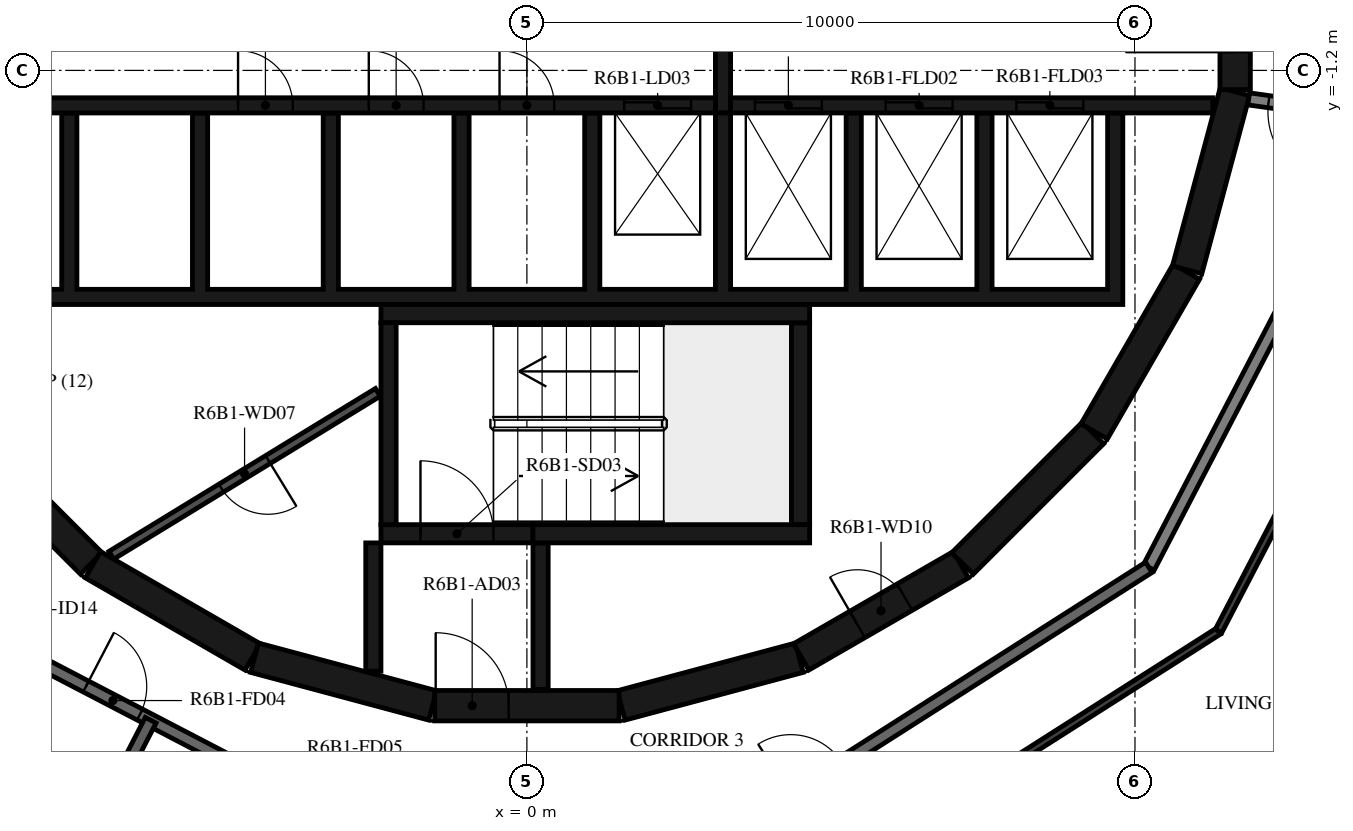
"""IFC4 building model, lengths in metres.
Left out: names, types, materials, properties, quantities, classifications, styles, units other than length and angle.
Written with IfcOpenShell. Run it as: python <this file> out.ifc"""

import sys

from ifc_helpers import new_model, si_unit, direction, frame, frame_2d, origin, place, context, subcontext, project, spatial, polyline, rectangle, outline, extrude, element, fill, save


model = new_model("IFC4")
c1 = context("Model", 3, precision=1e-05, world=origin(), true_north=direction((0.0, 1.0)))
c2 = subcontext(c1, "Body", "Model", "MODEL_VIEW")
j1 = project(units=[si_unit("LENGTHUNIT", "METRE"), si_unit("PLANEANGLEUNIT", "RADIAN")], contexts=[c1])
p1 = place(None, origin())
s1 = spatial("IfcSite", under=j1, at=p1, CompositionType="ELEMENT")
p2 = place(p1, origin())
s2 = spatial("IfcBuilding", under=s1, at=p2, CompositionType="ELEMENT")
p3 = place(p2, frame((0.0, 0.0, 237.2)))
s3 = spatial("IfcBuildingStorey", under=s2, at=p3, CompositionType="ELEMENT", Elevation=237.2)
p4 = place(p3, frame((1.55, -11.643, 0.0), z_axis=(0.0, 0.0, 1.0), x_axis=(0.965948410781, 0.258734743916, 0.0)))
e1 = element("IfcWall", 1, at=p4, inside=s3, PredefinedType="SHEAR", context=c2, shape_type="SweptSolid", body=[
    extrude(rectangle(XDim=3.033, YDim=0.5, at=frame_2d((1.516, 0.0))), origin(), (0.0, 0.0, 1.0), 3.12),
])
p5 = place(p3, frame((4.51, -10.845, 0.0), z_axis=(0.0, 0.0, 1.0), x_axis=(0.865975092491, 0.500087131594, 0.0)))
e2 = element("IfcWall", 2, at=p5, inside=s3, PredefinedType="SHEAR", context=c2, shape_type="SweptSolid", body=[
    extrude(rectangle(XDim=3.033, YDim=0.5, at=frame_2d((1.516, 0.0))), origin(), (0.0, 0.0, 1.0), 3.12),
])
p6 = place(p5, frame((1.066, 0.0, 0.0)))
e3 = element("IfcOpeningElement", 3, at=p6, cuts=e2, PredefinedType="OPENING", context=c2, shape_type="SweptSolid", body=[
    extrude(rectangle(XDim=0.9, YDim=2.1, at=frame_2d((0.45, 1.05))), frame((0.0, 0.26, 0.0), z_axis=(0.0, -1.0, 0.0), x_axis=(1.0, 0.0, 0.0)), (0.0, 0.0, 1.0), 0.52),
])
p7 = place(p3, frame((7.164, -9.308, 0.0), z_axis=(0.0, 0.0, 1.0), x_axis=(0.707106781187, 0.707106781187, 0.0)))
e4 = element("IfcWall", 4, at=p7, inside=s3, PredefinedType="SHEAR", context=c2, shape_type="SweptSolid", body=[
    extrude(rectangle(XDim=3.032, YDim=0.5, at=frame_2d((1.516, 0.0))), origin(), (0.0, 0.0, 1.0), 3.12),
])
for number, where, z_axis, x_axis in (
    (5, (9.329, -7.137, 0.0), (0.0, 0.0, 1.0), (0.5, 0.866, 0.0)),
    (6, (10.858, -4.479, 0.0), (0.0, 0.0, 1.0), (0.259, 0.966, 0.0)),
):
    element("IfcWall", number, at=place(p3, frame(where, z_axis=z_axis, x_axis=x_axis)), inside=s3, PredefinedType="SHEAR", context=c2, shape_type="SweptSolid", body=[
        extrude(rectangle(XDim=3.033, YDim=0.5, at=frame_2d((1.516, 0.0))), origin(), (0.0, 0.0, 1.0), 3.12),
    ])
p8 = place(p3, frame((11.647, -1.516, 0.0), z_axis=(0.0, 0.0, 1.0), x_axis=(0.0, 1.0, 0.0)))
e7 = element("IfcWall", 7, at=p8, inside=s3, PredefinedType="SHEAR", context=c2, shape_type="SweptSolid", body=[
    extrude(rectangle(XDim=3.033, YDim=0.5, at=frame_2d((1.516, 0.0))), origin(), (0.0, 0.0, 1.0), 3.12),
])
p9 = place(p8, frame((0.616, 0.0, 0.0)))
e8 = element("IfcOpeningElement", 8, at=p9, cuts=e7, PredefinedType="OPENING", context=c2, shape_type="SweptSolid", body=[
    extrude(rectangle(XDim=1.8, YDim=2.1, at=frame_2d((0.9, 1.05))), frame((0.0, 0.26, 0.0), z_axis=(0.0, -1.0, 0.0), x_axis=(1.0, 0.0, 0.0)), (0.0, 0.0, 1.0), 0.52),
])
p10 = place(p3, frame((-9.308, -7.164, 0.0), z_axis=(0.0, 0.0, 1.0), x_axis=(0.707106781187, -0.707106781187, 0.0)))
e9 = element("IfcWall", 9, at=p10, inside=s3, PredefinedType="SHEAR", context=c2, shape_type="SweptSolid", body=[
    extrude(rectangle(XDim=3.032, YDim=0.5, at=frame_2d((1.516, 0.0))), origin(), (0.0, 0.0, 1.0), 3.12),
])
for number, where, z_axis, x_axis in (
    (10, (-7.137, -9.329, 0.0), (0.0, 0.0, 1.0), (0.866, -0.5, 0.0)),
    (11, (-4.479, -10.858, 0.0), (0.0, 0.0, 1.0), (0.966, -0.259, 0.0)),
):
    element("IfcWall", number, at=place(p3, frame(where, z_axis=z_axis, x_axis=x_axis)), inside=s3, PredefinedType="SHEAR", context=c2, shape_type="SweptSolid", body=[
        extrude(rectangle(XDim=3.033, YDim=0.5, at=frame_2d((1.516, 0.0))), origin(), (0.0, 0.0, 1.0), 3.12),
    ])
p11 = place(p3, frame((-1.516, -11.647, 0.0), z_axis=(0.0, 0.0, 1.0), x_axis=(1.0, 0.0, 0.0)))
e12 = element("IfcWall", 12, at=p11, inside=s3, PredefinedType="SHEAR", context=c2, shape_type="SweptSolid", body=[
    extrude(rectangle(XDim=3.033, YDim=0.5, at=frame_2d((1.516, 0.0))), origin(), (0.0, 0.0, 1.0), 3.12),
])
p12 = place(p11, frame((0.016, 0.0, 0.0)))
e13 = element("IfcOpeningElement", 13, at=p12, cuts=e12, PredefinedType="OPENING", context=c2, shape_type="SweptSolid", body=[
    extrude(rectangle(XDim=1.2, YDim=2.1, at=frame_2d((0.6, 1.05))), frame((0.0, 0.26, 0.0), z_axis=(0.0, -1.0, 0.0), x_axis=(1.0, 0.0, 0.0)), (0.0, 0.0, 1.0), 0.52),
])
p13 = place(p3, frame((-2.275, -8.67, 0.0), z_axis=(0.0, 0.0, 1.0), x_axis=(0.0, 1.0, 0.0)))
e14 = element("IfcWall", 14, at=p13, inside=s3, PredefinedType="SHEAR", context=c2, shape_type="SweptSolid", body=[
    extrude(rectangle(XDim=3.32, YDim=0.25, at=frame_2d((1.66, 0.0))), origin(), (0.0, 0.0, 1.0), 3.12),
])
p14 = place(p3, frame((-2.4, -5.2, 0.0), z_axis=(0.0, 0.0, 1.0), x_axis=(1.0, 0.0, 0.0)))
e15 = element("IfcWall", 15, at=p14, inside=s3, PredefinedType="SHEAR", context=c2, shape_type="SweptSolid", body=[
    extrude(rectangle(XDim=7.05, YDim=0.3, at=frame_2d((3.525, 0.0))), origin(), (0.0, 0.0, 1.0), 3.12),
])
p15 = place(p3, frame((4.5, -8.67, 0.0), z_axis=(0.0, 0.0, 1.0), x_axis=(0.0, 1.0, 0.0)))
e16 = element("IfcWall", 16, at=p15, inside=s3, PredefinedType="SHEAR", context=c2, shape_type="SweptSolid", body=[
    extrude(rectangle(XDim=3.32, YDim=0.3, at=frame_2d((1.66, 0.0))), origin(), (0.0, 0.0, 1.0), 3.12),
])
p16 = place(p3, frame((0.1, -8.82, 0.0), z_axis=(0.0, 0.0, 1.0), x_axis=(1.0, 0.0, 0.0)))
e17 = element("IfcWall", 17, at=p16, inside=s3, PredefinedType="SHEAR", context=c2, shape_type="SweptSolid", body=[
    extrude(rectangle(XDim=4.55, YDim=0.3, at=frame_2d((2.275, 0.0))), origin(), (0.0, 0.0, 1.0), 3.12),
])
p17 = place(p3, frame((-2.4, -8.82, 0.0), z_axis=(0.0, 0.0, 1.0), x_axis=(1.0, 0.0, 0.0)))
e18 = element("IfcWall", 18, at=p17, inside=s3, PredefinedType="SHEAR", context=c2, shape_type="SweptSolid", body=[
    extrude(rectangle(XDim=2.5, YDim=0.3, at=frame_2d((1.25, 0.0))), origin(), (0.0, 0.0, 1.0), 3.12),
])
p18 = place(p17, frame((0.65, 0.0, 0.0)))
e19 = element("IfcOpeningElement", 19, at=p18, cuts=e18, PredefinedType="OPENING", context=c2, shape_type="SweptSolid", body=[
    extrude(rectangle(XDim=1.2, YDim=2.1, at=frame_2d((0.6, 1.05))), frame((0.0, 0.16, 0.0), z_axis=(0.0, -1.0, 0.0), x_axis=(1.0, 0.0, 0.0)), (0.0, 0.0, 1.0), 0.32),
])
p19 = place(p3, frame((-2.525, -8.97, 0.0), z_axis=(0.0, 0.0, 1.0), x_axis=(0.0, -1.0, 0.0)))
e20 = element("IfcWall", 20, at=p19, inside=s3, PredefinedType="SHEAR", context=c2, shape_type="SweptSolid", body=[
    extrude(rectangle(XDim=2.11, YDim=0.25, at=frame_2d((1.055, 0.0))), origin(), (0.0, 0.0, 1.0), 3.12),
])
p20 = place(p3, frame((0.225, -8.97, 0.0), z_axis=(0.0, 0.0, 1.0), x_axis=(0.0, -1.0, 0.0)))
e21 = element("IfcWall", 21, at=p20, inside=s3, PredefinedType="SHEAR", context=c2, shape_type="SweptSolid", body=[
    extrude(rectangle(XDim=2.41, YDim=0.25, at=frame_2d((1.205, 0.0))), origin(), (0.0, 0.0, 1.0), 3.12),
])
p21 = place(p3, origin())
e22 = element("IfcWall", 22, at=p21, inside=s3, PredefinedType="SHEAR", context=c2, shape_type="SweptSolid", body=[
    extrude(outline(polyline([(9.8, -5.05), (9.8, -4.8), (9.8, -1.9), (9.55, -1.9), (9.55, -4.8), (7.65, -4.8), (7.65, -1.9), (7.4, -1.9), (7.4, -4.8), (5.5, -4.8), (5.5, -1.9), (5.25, -1.9), (5.25, -4.8), (3.35, -4.8), (3.35, -1.9), (3.1, -1.9), (3.1, -4.8), (1.2, -4.8), (1.2, -1.9), (0.95, -1.9), (0.95, -4.8), (-0.95, -4.8), (-0.95, -1.9), (-1.2, -1.9), (-1.2, -4.8), (-3.1, -4.8), (-3.1, -1.9), (-3.35, -1.9), (-3.35, -4.8), (-5.25, -4.8), (-5.25, -1.9), (-5.5, -1.9), (-5.5, -4.8), (-7.4, -4.8), (-7.4, -1.9), (-7.65, -1.9), (-7.65, -4.8), (-9.55, -4.8), (-9.55, -1.9), (-9.8, -1.9), (-9.8, -4.8), (-9.8, -5.05), (9.8, -5.05)])), origin(), (0.0, 0.0, 1.0), 3.12),
])
p22 = place(p3, frame((-11.28, -1.775, 0.0), z_axis=(0.0, 0.0, 1.0), x_axis=(1.0, 0.0, 0.0)))
e23 = element("IfcWall", 23, at=p22, inside=s3, PredefinedType="SHEAR", context=c2, shape_type="SweptSolid", body=[
    extrude(rectangle(XDim=14.38, YDim=0.25, at=frame_2d((7.19, 0.0))), origin(), (0.0, 0.0, 1.0), 3.12),
])
p23 = place(p22, frame((12.88, 0.0, 0.0)))
e24 = element("IfcOpeningElement", 24, at=p23, cuts=e23, PredefinedType="OPENING", context=c2, shape_type="SweptSolid", body=[
    extrude(rectangle(XDim=1.1, YDim=2.1, at=frame_2d((0.55, 1.05))), frame((0.0, 0.135, 0.0), z_axis=(0.0, -1.0, 0.0), x_axis=(1.0, 0.0, 0.0)), (0.0, 0.0, 1.0), 0.27),
])
p24 = place(p22, frame((6.53, 0.0, 0.0)))
e25 = element("IfcOpeningElement", 25, at=p24, cuts=e23, PredefinedType="OPENING", context=c2, shape_type="SweptSolid", body=[
    extrude(rectangle(XDim=0.9, YDim=2.1, at=frame_2d((0.45, 1.05))), frame((0.0, 0.135, 0.0), z_axis=(0.0, -1.0, 0.0), x_axis=(1.0, 0.0, 0.0)), (0.0, 0.0, 1.0), 0.27),
])
p25 = place(p22, frame((8.68, 0.0, 0.0)))
e26 = element("IfcOpeningElement", 26, at=p25, cuts=e23, PredefinedType="OPENING", context=c2, shape_type="SweptSolid", body=[
    extrude(rectangle(XDim=0.9, YDim=2.1, at=frame_2d((0.45, 1.05))), frame((0.0, 0.135, 0.0), z_axis=(0.0, -1.0, 0.0), x_axis=(1.0, 0.0, 0.0)), (0.0, 0.0, 1.0), 0.27),
])
p26 = place(p22, frame((10.83, 0.0, 0.0)))
e27 = element("IfcOpeningElement", 27, at=p26, cuts=e23, PredefinedType="OPENING", context=c2, shape_type="SweptSolid", body=[
    extrude(rectangle(XDim=0.9, YDim=2.1, at=frame_2d((0.45, 1.05))), frame((0.0, 0.135, 0.0), z_axis=(0.0, -1.0, 0.0), x_axis=(1.0, 0.0, 0.0)), (0.0, 0.0, 1.0), 0.27),
])
p27 = place(p3, frame((3.35, -1.775, 0.0), z_axis=(0.0, 0.0, 1.0), x_axis=(1.0, 0.0, 0.0)))
e28 = element("IfcWall", 28, at=p27, inside=s3, PredefinedType="SHEAR", context=c2, shape_type="SweptSolid", body=[
    extrude(rectangle(XDim=7.93, YDim=0.25, at=frame_2d((3.965, 0.0))), origin(), (0.0, 0.0, 1.0), 3.12),
])
p28 = place(p27, frame((0.4, 0.0, 0.0)))
e29 = element("IfcOpeningElement", 29, at=p28, cuts=e28, PredefinedType="OPENING", context=c2, shape_type="SweptSolid", body=[
    extrude(rectangle(XDim=1.1, YDim=2.4, at=frame_2d((0.55, 1.2))), frame((0.0, 0.135, 0.0), z_axis=(0.0, -1.0, 0.0), x_axis=(1.0, 0.0, 0.0)), (0.0, 0.0, 1.0), 0.27),
])
p29 = place(p27, frame((2.55, 0.0, 0.0)))
e30 = element("IfcOpeningElement", 30, at=p29, cuts=e28, PredefinedType="OPENING", context=c2, shape_type="SweptSolid", body=[
    extrude(rectangle(XDim=1.1, YDim=2.4, at=frame_2d((0.55, 1.2))), frame((0.0, 0.135, 0.0), z_axis=(0.0, -1.0, 0.0), x_axis=(1.0, 0.0, 0.0)), (0.0, 0.0, 1.0), 0.27),
])
p30 = place(p27, frame((4.7, 0.0, 0.0)))
e31 = element("IfcOpeningElement", 31, at=p30, cuts=e28, PredefinedType="OPENING", context=c2, shape_type="SweptSolid", body=[
    extrude(rectangle(XDim=1.1, YDim=2.4, at=frame_2d((0.55, 1.2))), frame((0.0, 0.135, 0.0), z_axis=(0.0, -1.0, 0.0), x_axis=(1.0, 0.0, 0.0)), (0.0, 0.0, 1.0), 0.27),
])
p31 = place(p3, frame((3.225, -1.9, 0.0), z_axis=(0.0, 0.0, 1.0), x_axis=(0.0, 1.0, 0.0)))
e32 = element("IfcWall", 32, at=p31, inside=s3, PredefinedType="SHEAR", context=c2, shape_type="SweptSolid", body=[
    extrude(rectangle(XDim=3.8, YDim=0.25, at=frame_2d((1.9, 0.0))), origin(), (0.0, 0.0, 1.0), 3.12),
])
p32 = place(p3, frame((-2.451, -6.495, 0.0), z_axis=(0.0, 0.0, 1.0), x_axis=(-0.853250115418, -0.521501908471, 0.0)))
e33 = element("IfcWall", 33, at=p32, inside=s3, PredefinedType="PARTITIONING", context=c2, shape_type="SweptSolid", body=[
    extrude(rectangle(XDim=5.137, YDim=0.15, at=frame_2d((2.569, 0.0))), origin(), (0.0, 0.0, 1.0), 3.12),
])
p33 = place(p32, frame((2.119, 0.0, 0.0)))
e34 = element("IfcOpeningElement", 34, at=p33, cuts=e33, PredefinedType="OPENING", context=c2, shape_type="SweptSolid", body=[
    extrude(rectangle(XDim=0.9, YDim=2.1, at=frame_2d((0.45, 1.05))), frame((0.0, 0.085, 0.0), z_axis=(0.0, -1.0, 0.0), x_axis=(1.0, 0.0, 0.0)), (0.0, 0.0, 1.0), 0.17),
])
p34 = place(p3, frame((10.228, -9.372, 0.0), z_axis=(0.0, 0.0, 1.0), x_axis=(0.461759464021, 0.887005184532, 0.0)))
e35 = element("IfcWall", 35, at=p34, inside=s3, PredefinedType="STANDARD", context=c2, shape_type="SweptSolid", body=[
    extrude(rectangle(XDim=7.181, YDim=0.2, at=frame_2d((3.591, 0.0))), origin(), (0.0, 0.0, 1.0), 3.12),
])
p35 = place(p3, frame((13.496, -1.897, 0.0), z_axis=(0.0, 0.0, 1.0), x_axis=(-0.99026234641, 0.139213811391, 0.0)))
e36 = element("IfcWall", 36, at=p35, inside=s3, PredefinedType="STANDARD", context=c2, shape_type="SweptSolid", body=[
    extrude(rectangle(XDim=1.641, YDim=0.2, at=frame_2d((0.821, 0.0))), origin(), (0.0, 0.0, 1.0), 3.12),
])
p36 = place(p35, frame((0.11, 0.0, 0.0)))
e37 = element("IfcOpeningElement", 37, at=p36, cuts=e36, PredefinedType="OPENING", context=c2, shape_type="SweptSolid", body=[
    extrude(rectangle(XDim=1.2, YDim=2.1, at=frame_2d((0.6, 1.05))), frame((0.0, 0.11, 0.0), z_axis=(0.0, -1.0, 0.0), x_axis=(1.0, 0.0, 0.0)), (0.0, 0.0, 1.0), 0.22),
])
p37 = place(p3, frame((-9.372, -10.228, 0.0), z_axis=(0.0, 0.0, 1.0), x_axis=(0.887005184532, -0.461759464021, 0.0)))
e38 = element("IfcWall", 38, at=p37, inside=s3, PredefinedType="STANDARD", context=c2, shape_type="SweptSolid", body=[
    extrude(rectangle(XDim=7.181, YDim=0.2, at=frame_2d((3.591, 0.0))), origin(), (0.0, 0.0, 1.0), 3.12),
])
p38 = place(p37, frame((2.391, 0.0, 0.0)))
e39 = element("IfcOpeningElement", 39, at=p38, cuts=e38, PredefinedType="OPENING", context=c2, shape_type="SweptSolid", body=[
    extrude(rectangle(XDim=1.0, YDim=2.1, at=frame_2d((0.5, 1.05))), frame((0.0, 0.11, 0.0), z_axis=(0.0, -1.0, 0.0), x_axis=(1.0, 0.0, 0.0)), (0.0, 0.0, 1.0), 0.22),
])
p39 = place(p3, frame((4.172, -13.231, 0.0), z_axis=(0.0, 0.0, 1.0), x_axis=(0.843388394728, 0.537304397561, 0.0)))
e40 = element("IfcWall", 40, at=p39, inside=s3, PredefinedType="STANDARD", context=c2, shape_type="SweptSolid", body=[
    extrude(rectangle(XDim=7.181, YDim=0.2, at=frame_2d((3.59, 0.0))), origin(), (0.0, 0.0, 1.0), 3.12),
])
p40 = place(p39, frame((0.2, 0.0, 0.0)))
e41 = element("IfcOpeningElement", 41, at=p40, cuts=e40, PredefinedType="OPENING", context=c2, shape_type="SweptSolid", body=[
    extrude(rectangle(XDim=1.0, YDim=2.1, at=frame_2d((0.5, 1.05))), frame((0.0, 0.11, 0.0), z_axis=(0.0, -1.0, 0.0), x_axis=(1.0, 0.0, 0.0)), (0.0, 0.0, 1.0), 0.22),
])
p41 = place(p3, frame((-8.303, -15.996, 0.0), z_axis=(0.0, 0.0, 1.0), x_axis=(0.457702371186, 0.889105471477, 0.0)))
e42 = element("IfcWall", 42, at=p41, inside=s3, PredefinedType="STANDARD", context=c2, shape_type="SweptSolid", body=[
    extrude(rectangle(XDim=4.623, YDim=0.2, at=frame_2d((2.312, 0.0))), origin(), (0.0, 0.0, 1.0), 3.12),
])
p42 = place(p3, frame((7.605, -12.822, 0.0), z_axis=(0.0, 0.0, 1.0), x_axis=(0.843413865585, 0.537264414733, 0.0)))
e43 = element("IfcWall", 43, at=p42, inside=s3, PredefinedType="PARTITIONING", context=c2, shape_type="SweptSolid", body=[
    extrude(rectangle(XDim=4.467, YDim=0.12, at=frame_2d((2.234, 0.0))), origin(), (0.0, 0.0, 1.0), 3.12),
])
p43 = place(p3, frame((11.373, -10.421, 0.0), z_axis=(0.0, 0.0, 1.0), x_axis=(0.461746745223, 0.887011805601, 0.0)))
e44 = element("IfcWall", 44, at=p43, inside=s3, PredefinedType="PARTITIONING", context=c2, shape_type="SweptSolid", body=[
    extrude(rectangle(XDim=7.803, YDim=0.12, at=frame_2d((3.901, 0.0))), origin(), (0.0, 0.0, 1.0), 3.12),
])
p44 = place(p43, frame((4.431, 0.0, 0.0)))
e45 = element("IfcOpeningElement", 45, at=p44, cuts=e44, PredefinedType="OPENING", context=c2, shape_type="SweptSolid", body=[
    extrude(rectangle(XDim=0.8, YDim=2.1, at=frame_2d((0.4, 1.05))), frame((0.0, 0.07, 0.0), z_axis=(0.0, -1.0, 0.0), x_axis=(1.0, 0.0, 0.0)), (0.0, 0.0, 1.0), 0.14),
])
p45 = place(p18, origin())
e46 = element("IfcDoor", 46, at=p45, inside=s3, OperationType="SINGLE_SWING_LEFT", PredefinedType="DOOR", context=c2, shape_type="SweptSolid", body=[
    extrude(rectangle(XDim=1.2, YDim=2.1, at=frame_2d((0.6, 1.05))), frame((0.0, 0.025, 0.0), z_axis=(0.0, -1.0, 0.0), x_axis=(1.0, 0.0, 0.0)), (0.0, 0.0, 1.0), 0.05),
])
fill(e19, e46)
p46 = place(p12, origin())
e47 = element("IfcDoor", 47, at=p46, inside=s3, OperationType="SINGLE_SWING_RIGHT", PredefinedType="DOOR", context=c2, shape_type="SweptSolid", body=[
    extrude(rectangle(XDim=1.2, YDim=2.1, at=frame_2d((0.6, 1.05))), frame((0.0, 0.025, 0.0), z_axis=(0.0, -1.0, 0.0), x_axis=(1.0, 0.0, 0.0)), (0.0, 0.0, 1.0), 0.05),
])
fill(e13, e47)
p47 = place(p9, origin())
e48 = element("IfcDoor", 48, at=p47, inside=s3, OperationType="DOUBLE_DOOR_SINGLE_SWING", PredefinedType="DOOR", context=c2, shape_type="SweptSolid", body=[
    extrude(rectangle(XDim=1.8, YDim=2.1, at=frame_2d((0.9, 1.05))), frame((0.0, 0.025, 0.0), z_axis=(0.0, -1.0, 0.0), x_axis=(1.0, 0.0, 0.0)), (0.0, 0.0, 1.0), 0.05),
])
fill(e8, e48)
p48 = place(p23, origin())
e49 = element("IfcDoor", 49, at=p48, inside=s3, OperationType="DOUBLE_DOOR_SLIDING", PredefinedType="DOOR", context=c2, shape_type="SweptSolid", body=[
    extrude(rectangle(XDim=1.1, YDim=2.1, at=frame_2d((0.55, 1.05))), frame((0.0, 0.025, 0.0), z_axis=(0.0, -1.0, 0.0), x_axis=(1.0, 0.0, 0.0)), (0.0, 0.0, 1.0), 0.05),
])
fill(e24, e49)
p49 = place(p28, origin())
e50 = element("IfcDoor", 50, at=p49, inside=s3, OperationType="DOUBLE_DOOR_SLIDING", PredefinedType="DOOR", context=c2, shape_type="SweptSolid", body=[
    extrude(rectangle(XDim=1.1, YDim=2.4, at=frame_2d((0.55, 1.2))), frame((0.0, 0.025, 0.0), z_axis=(0.0, -1.0, 0.0), x_axis=(1.0, 0.0, 0.0)), (0.0, 0.0, 1.0), 0.05),
])
fill(e29, e50)
p50 = place(p29, origin())
e51 = element("IfcDoor", 51, at=p50, inside=s3, OperationType="DOUBLE_DOOR_SLIDING", PredefinedType="DOOR", context=c2, shape_type="SweptSolid", body=[
    extrude(rectangle(XDim=1.1, YDim=2.4, at=frame_2d((0.55, 1.2))), frame((0.0, 0.025, 0.0), z_axis=(0.0, -1.0, 0.0), x_axis=(1.0, 0.0, 0.0)), (0.0, 0.0, 1.0), 0.05),
])
fill(e30, e51)
p51 = place(p30, origin())
e52 = element("IfcDoor", 52, at=p51, inside=s3, OperationType="DOUBLE_DOOR_SLIDING", PredefinedType="DOOR", context=c2, shape_type="SweptSolid", body=[
    extrude(rectangle(XDim=1.1, YDim=2.4, at=frame_2d((0.55, 1.2))), frame((0.0, 0.025, 0.0), z_axis=(0.0, -1.0, 0.0), x_axis=(1.0, 0.0, 0.0)), (0.0, 0.0, 1.0), 0.05),
])
fill(e31, e52)
p52 = place(p24, origin())
e53 = element("IfcDoor", 53, at=p52, inside=s3, OperationType="SINGLE_SWING_RIGHT", PredefinedType="DOOR", context=c2, shape_type="SweptSolid", body=[
    extrude(rectangle(XDim=0.9, YDim=2.1, at=frame_2d((0.45, 1.05))), frame((0.0, 0.025, 0.0), z_axis=(0.0, -1.0, 0.0), x_axis=(1.0, 0.0, 0.0)), (0.0, 0.0, 1.0), 0.05),
])
fill(e25, e53)
p53 = place(p25, origin())
e54 = element("IfcDoor", 54, at=p53, inside=s3, OperationType="SINGLE_SWING_LEFT", PredefinedType="DOOR", context=c2, shape_type="SweptSolid", body=[
    extrude(rectangle(XDim=0.9, YDim=2.1, at=frame_2d((0.45, 1.05))), frame((0.0, 0.025, 0.0), z_axis=(0.0, -1.0, 0.0), x_axis=(1.0, 0.0, 0.0)), (0.0, 0.0, 1.0), 0.05),
])
fill(e26, e54)
p54 = place(p26, origin())
e55 = element("IfcDoor", 55, at=p54, inside=s3, OperationType="SINGLE_SWING_RIGHT", PredefinedType="DOOR", context=c2, shape_type="SweptSolid", body=[
    extrude(rectangle(XDim=0.9, YDim=2.1, at=frame_2d((0.45, 1.05))), frame((0.0, 0.025, 0.0), z_axis=(0.0, -1.0, 0.0), x_axis=(1.0, 0.0, 0.0)), (0.0, 0.0, 1.0), 0.05),
])
fill(e27, e55)
p55 = place(p33, origin())
e56 = element("IfcDoor", 56, at=p55, inside=s3, OperationType="SINGLE_SWING_LEFT", PredefinedType="DOOR", context=c2, shape_type="SweptSolid", body=[
    extrude(rectangle(XDim=0.9, YDim=2.1, at=frame_2d((0.45, 1.05))), frame((0.0, 0.025, 0.0), z_axis=(0.0, -1.0, 0.0), x_axis=(1.0, 0.0, 0.0)), (0.0, 0.0, 1.0), 0.05),
])
fill(e34, e56)
p56 = place(p6, origin())
e57 = element("IfcDoor", 57, at=p56, inside=s3, OperationType="SINGLE_SWING_RIGHT", PredefinedType="DOOR", context=c2, shape_type="SweptSolid", body=[
    extrude(rectangle(XDim=0.9, YDim=2.1, at=frame_2d((0.45, 1.05))), frame((0.0, 0.025, 0.0), z_axis=(0.0, -1.0, 0.0), x_axis=(1.0, 0.0, 0.0)), (0.0, 0.0, 1.0), 0.05),
])
fill(e3, e57)
p57 = place(p38, origin())
e58 = element("IfcDoor", 58, at=p57, inside=s3, OperationType="SINGLE_SWING_RIGHT", PredefinedType="DOOR", context=c2, shape_type="SweptSolid", body=[
    extrude(rectangle(XDim=1.0, YDim=2.1, at=frame_2d((0.5, 1.05))), frame((0.0, 0.025, 0.0), z_axis=(0.0, -1.0, 0.0), x_axis=(1.0, 0.0, 0.0)), (0.0, 0.0, 1.0), 0.05),
])
fill(e39, e58)
p58 = place(p36, origin())
e59 = element("IfcDoor", 59, at=p58, inside=s3, OperationType="DOUBLE_DOOR_SINGLE_SWING", PredefinedType="DOOR", context=c2, shape_type="SweptSolid", body=[
    extrude(rectangle(XDim=1.2, YDim=2.1, at=frame_2d((0.6, 1.05))), frame((0.0, 0.025, 0.0), z_axis=(0.0, -1.0, 0.0), x_axis=(1.0, 0.0, 0.0)), (0.0, 0.0, 1.0), 0.05),
])
fill(e37, e59)
save(model, sys.argv[1])
